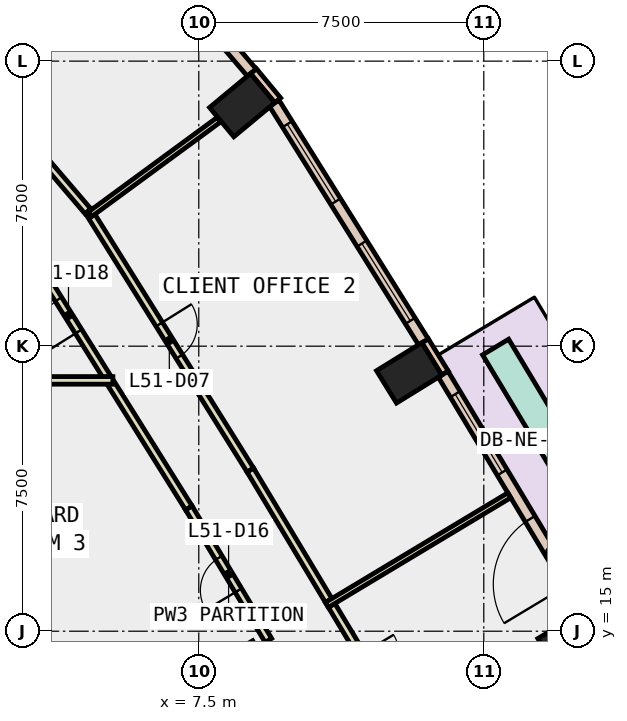
"""IFC4 building model, lengths in metres.
Left out: names, types, materials, properties, quantities, classifications, styles, units other than length and angle.
Written with IfcOpenShell. Run it as: python <this file> out.ifc"""

import sys

from ifc_helpers import new_model, si_unit, direction, frame, frame_2d, origin, origin_2d, place, context, subcontext, project, spatial, rectangle, extrude, element, fill, save


model = new_model("IFC4")
c1 = context("Model", 3, precision=1e-05, world=origin(), true_north=direction((0.0, 1.0)))
c2 = subcontext(c1, "Body", "Model", "MODEL_VIEW")
j1 = project(units=[si_unit("LENGTHUNIT", "METRE"), si_unit("PLANEANGLEUNIT", "RADIAN")], contexts=[c1])
p1 = place(None, origin())
s1 = spatial("IfcSite", under=j1, at=p1, CompositionType="ELEMENT")
p2 = place(p1, origin())
s2 = spatial("IfcBuilding", under=s1, at=p2, CompositionType="ELEMENT")
p3 = place(p2, frame((0.0, 0.0, 227.6)))
s3 = spatial("IfcBuildingStorey", under=s2, at=p3, CompositionType="ELEMENT", Elevation=227.6)
for number, where, z_axis, x_axis in (
    (1, (17.28, 14.733, -0.4), (0.0, 0.0, 1.0), (-0.509, 0.861, 0.0)),
    (2, (13.036, 21.797, -0.4), (0.0, 0.0, 1.0), (-0.525, 0.851, 0.0)),
    (3, (8.642, 28.842, -0.4), (0.0, 0.0, 1.0), (-0.639, 0.769, 0.0)),
):
    element("IfcColumn", number, at=place(p3, frame(where, z_axis=z_axis, x_axis=x_axis)), inside=s3, PredefinedType="COLUMN", context=c2, shape_type="SweptSolid", body=[
        extrude(rectangle(XDim=1.0, YDim=1.4, at=origin_2d()), origin(), (0.0, 0.0, 1.0), 4.2),
    ])
p4 = place(p3, frame((13.98, 21.792, 0.0), z_axis=(0.0, 0.0, 1.0), x_axis=(-0.525648735675, 0.850701714282, 0.0)))
e4 = element("IfcWall", 4, at=p4, inside=s3, PredefinedType="STANDARD", context=c2, shape_type="SweptSolid", body=[
    extrude(rectangle(XDim=1.0, YDim=0.2, at=frame_2d((0.5, 0.0))), origin(), (0.0, 0.0, 1.0), 3.8),
])
p5 = place(p3, frame((9.577, 28.968, 0.0), z_axis=(0.0, 0.0, 1.0), x_axis=(-0.637972365578, 0.770059257953, 0.0)))
e5 = element("IfcWall", 5, at=p5, inside=s3, PredefinedType="STANDARD", context=c2, shape_type="SweptSolid", body=[
    extrude(rectangle(XDim=1.0, YDim=0.2, at=frame_2d((0.5, 0.0))), origin(), (0.0, 0.0, 1.0), 3.8),
])
p6 = place(p3, frame((17.669, 15.542, 0.0), z_axis=(0.0, 0.0, 1.0), x_axis=(-0.515049705348, 0.857160312323, 0.0)))
e6 = element("IfcWall", 6, at=p6, inside=s3, PredefinedType="STANDARD", context=c2, shape_type="SweptSolid", body=[
    extrude(rectangle(XDim=7.258, YDim=0.3, at=frame_2d((3.629, 0.0))), origin(), (0.0, 0.0, 1.0), 3.8),
])
p7 = place(p6, frame((0.814, 0.0, 0.0)))
e7 = element("IfcOpeningElement", 7, at=p7, cuts=e6, PredefinedType="OPENING", context=c2, shape_type="SweptSolid", body=[
    extrude(rectangle(XDim=2.0, YDim=2.4, at=frame_2d((1.0, 1.2))), frame((0.0, 0.16, 0.0), z_axis=(0.0, -1.0, 0.0), x_axis=(1.0, 0.0, 0.0)), (0.0, 0.0, 1.0), 0.32),
])
p8 = place(p6, frame((4.243, 0.0, 0.9)))
e8 = element("IfcOpeningElement", 8, at=p8, cuts=e6, PredefinedType="OPENING", context=c2, shape_type="SweptSolid", body=[
    extrude(rectangle(XDim=2.4, YDim=2.6, at=frame_2d((1.2, 1.3))), frame((0.0, 0.16, 0.0), z_axis=(0.0, -1.0, 0.0), x_axis=(1.0, 0.0, 0.0)), (0.0, 0.0, 1.0), 0.32),
])
p9 = place(p3, frame((13.41, 22.614, 0.0), z_axis=(0.0, 0.0, 1.0), x_axis=(-0.530037467052, 0.847974223383, 0.0)))
e9 = element("IfcWall", 9, at=p9, inside=s3, PredefinedType="STANDARD", context=c2, shape_type="SweptSolid", body=[
    extrude(rectangle(XDim=7.405, YDim=0.3, at=frame_2d((3.702, 0.0))), origin(), (0.0, 0.0, 1.0), 3.8),
])
p10 = place(p9, frame((0.651, 0.0, 0.9)))
e10 = element("IfcOpeningElement", 10, at=p10, cuts=e9, PredefinedType="OPENING", context=c2, shape_type="SweptSolid", body=[
    extrude(rectangle(XDim=2.4, YDim=2.6, at=frame_2d((1.2, 1.3))), frame((0.0, 0.16, 0.0), z_axis=(0.0, -1.0, 0.0), x_axis=(1.0, 0.0, 0.0)), (0.0, 0.0, 1.0), 0.32),
])
p11 = place(p9, frame((4.354, 0.0, 0.9)))
e11 = element("IfcOpeningElement", 11, at=p11, cuts=e9, PredefinedType="OPENING", context=c2, shape_type="SweptSolid", body=[
    extrude(rectangle(XDim=2.4, YDim=2.6, at=frame_2d((1.2, 1.3))), frame((0.0, 0.16, 0.0), z_axis=(0.0, -1.0, 0.0), x_axis=(1.0, 0.0, 0.0)), (0.0, 0.0, 1.0), 0.32),
])
p12 = place(p3, frame((8.895, 29.7, 0.0), z_axis=(0.0, 0.0, 1.0), x_axis=(-0.649967502437, 0.75996200285, 0.0)))
e12 = element("IfcWall", 12, at=p12, inside=s3, PredefinedType="STANDARD", context=c2, shape_type="SweptSolid", body=[
    extrude(rectangle(XDim=4.492, YDim=0.3, at=frame_2d((2.246, 0.0))), origin(), (0.0, 0.0, 1.0), 3.8),
])
p13 = place(p12, frame((1.546, 0.0, 0.9)))
e13 = element("IfcOpeningElement", 13, at=p13, cuts=e12, PredefinedType="OPENING", context=c2, shape_type="SweptSolid", body=[
    extrude(rectangle(XDim=1.4, YDim=2.6, at=frame_2d((0.7, 1.3))), frame((0.0, 0.16, 0.0), z_axis=(0.0, -1.0, 0.0), x_axis=(1.0, 0.0, 0.0)), (0.0, 0.0, 1.0), 0.32),
])
p14 = place(p3, frame((18.946, 16.426, 0.0), z_axis=(0.0, 0.0, 1.0), x_axis=(-0.51495344021, 0.857218148674, 0.0)))
e14 = element("IfcWall", 14, at=p14, inside=s3, PredefinedType="STANDARD", context=c2, shape_type="SweptSolid", body=[
    extrude(rectangle(XDim=7.059, YDim=0.8, at=frame_2d((3.529, 0.0))), origin(), (0.0, 0.0, 1.0), 0.8),
])
p15 = place(p3, frame((9.332, 14.759, 0.0), z_axis=(0.0, 0.0, 1.0), x_axis=(-0.514989912292, 0.857196237881, 0.0)))
e15 = element("IfcWall", 15, at=p15, inside=s3, PredefinedType="PARTITIONING", context=c2, shape_type="SweptSolid", body=[
    extrude(rectangle(XDim=4.068, YDim=0.2, at=frame_2d((2.034, 0.0))), origin(), (0.0, 0.0, 1.0), 3.8),
])
p16 = place(p15, frame((1.534, 0.0, 0.0)))
e16 = element("IfcOpeningElement", 16, at=p16, cuts=e15, PredefinedType="OPENING", context=c2, shape_type="SweptSolid", body=[
    extrude(rectangle(XDim=1.0, YDim=2.1, at=frame_2d((0.5, 1.05))), frame((0.0, 0.11, 0.0), z_axis=(0.0, -1.0, 0.0), x_axis=(1.0, 0.0, 0.0)), (0.0, 0.0, 1.0), 0.22),
])
p17 = place(p3, frame((7.237, 18.246, 0.0), z_axis=(0.0, 0.0, 1.0), x_axis=(-0.530175390862, 0.847887996686, 0.0)))
e17 = element("IfcWall", 17, at=p17, inside=s3, PredefinedType="PARTITIONING", context=c2, shape_type="SweptSolid", body=[
    extrude(rectangle(XDim=3.855, YDim=0.2, at=frame_2d((1.928, 0.0))), origin(), (0.0, 0.0, 1.0), 3.8),
])
p18 = place(p3, frame((5.087, 21.685, 0.0), z_axis=(0.0, 0.0, 1.0), x_axis=(-0.529998940003, 0.847998304005, 0.0)))
e18 = element("IfcWall", 18, at=p18, inside=s3, PredefinedType="PARTITIONING", context=c2, shape_type="SweptSolid", body=[
    extrude(rectangle(XDim=3.83, YDim=0.2, at=frame_2d((1.915, 0.0))), origin(), (0.0, 0.0, 1.0), 3.8),
])
p19 = place(p18, frame((1.416, 0.0, 0.0)))
e19 = element("IfcOpeningElement", 19, at=p19, cuts=e18, PredefinedType="OPENING", context=c2, shape_type="SweptSolid", body=[
    extrude(rectangle(XDim=1.0, YDim=2.1, at=frame_2d((0.5, 1.05))), frame((0.0, 0.11, 0.0), z_axis=(0.0, -1.0, 0.0), x_axis=(1.0, 0.0, 0.0)), (0.0, 0.0, 1.0), 0.22),
])
p20 = place(p3, frame((10.996, 15.679, 0.0), z_axis=(0.0, 0.0, 1.0), x_axis=(0.514800663461, -0.857309907152, 0.0)))
e20 = element("IfcWall", 20, at=p20, inside=s3, PredefinedType="PARTITIONING", context=c2, shape_type="SweptSolid", body=[
    extrude(rectangle(XDim=4.003, YDim=0.2, at=frame_2d((2.001, 0.0))), origin(), (0.0, 0.0, 1.0), 3.8),
])
p21 = place(p20, frame((1.502, 0.0, 0.0)))
e21 = element("IfcOpeningElement", 21, at=p21, cuts=e20, PredefinedType="OPENING", context=c2, shape_type="SweptSolid", body=[
    extrude(rectangle(XDim=1.0, YDim=2.1, at=frame_2d((0.5, 1.05))), frame((0.0, 0.11, 0.0), z_axis=(0.0, -1.0, 0.0), x_axis=(1.0, 0.0, 0.0)), (0.0, 0.0, 1.0), 0.22),
])
p22 = place(p3, frame((4.593, 26.061, 0.0), z_axis=(0.0, 0.0, 1.0), x_axis=(0.530012579093, -0.847989779421, 0.0)))
e22 = element("IfcWall", 22, at=p22, inside=s3, PredefinedType="PARTITIONING", context=c2, shape_type="SweptSolid", body=[
    extrude(rectangle(XDim=8.045, YDim=0.2, at=frame_2d((4.022, 0.0))), origin(), (0.0, 0.0, 1.0), 3.8),
])
p23 = place(p22, frame((3.522, 0.0, 0.0)))
e23 = element("IfcOpeningElement", 23, at=p23, cuts=e22, PredefinedType="OPENING", context=c2, shape_type="SweptSolid", body=[
    extrude(rectangle(XDim=1.0, YDim=2.1, at=frame_2d((0.5, 1.05))), frame((0.0, 0.11, 0.0), z_axis=(0.0, -1.0, 0.0), x_axis=(1.0, 0.0, 0.0)), (0.0, 0.0, 1.0), 0.22),
])
p24 = place(p3, frame((8.857, 19.239, 0.0), z_axis=(0.0, 0.0, 1.0), x_axis=(0.514953174362, -0.857218308376, 0.0)))
e24 = element("IfcWall", 24, at=p24, inside=s3, PredefinedType="PARTITIONING", context=c2, shape_type="SweptSolid", body=[
    extrude(rectangle(XDim=4.002, YDim=0.2, at=frame_2d((2.001, 0.0))), origin(), (0.0, 0.0, 1.0), 3.8),
])
p25 = place(p3, frame((2.316, 28.7, 0.0), z_axis=(0.0, 0.0, 1.0), x_axis=(0.650040973726, -0.759899159413, 0.0)))
e25 = element("IfcWall", 25, at=p25, inside=s3, PredefinedType="PARTITIONING", context=c2, shape_type="SweptSolid", body=[
    extrude(rectangle(XDim=3.485, YDim=0.2, at=frame_2d((1.742, 0.0))), origin(), (0.0, 0.0, 1.0), 3.8),
])
p26 = place(p3, frame((0.4, 21.6, 0.0), z_axis=(0.0, 0.0, 1.0), x_axis=(1.0, 0.0, 0.0)))
e26 = element("IfcWall", 26, at=p26, inside=s3, PredefinedType="PARTITIONING", context=c2, shape_type="SweptSolid", body=[
    extrude(rectangle(XDim=4.84, YDim=0.2, at=frame_2d((2.42, 0.0))), origin(), (0.0, 0.0, 1.0), 3.8),
])
p27 = place(p3, frame((10.871, 15.692, 0.0), z_axis=(0.0, 0.0, 1.0), x_axis=(0.857165756431, 0.515040645001, 0.0)))
e27 = element("IfcWall", 27, at=p27, inside=s3, PredefinedType="PARTITIONING", context=c2, shape_type="SweptSolid", body=[
    extrude(rectangle(XDim=5.6, YDim=0.15, at=frame_2d((2.8, 0.0))), origin(), (0.0, 0.0, 1.0), 3.8),
])
p28 = place(p3, frame((4.646, 25.976, 0.0), z_axis=(0.0, 0.0, 1.0), x_axis=(0.806134630684, 0.591732166788, 0.0)))
e28 = element("IfcWall", 28, at=p28, inside=s3, PredefinedType="PARTITIONING", context=c2, shape_type="SweptSolid", body=[
    extrude(rectangle(XDim=4.193, YDim=0.15, at=frame_2d((2.096, 0.0))), origin(), (0.0, 0.0, 1.0), 3.8),
])
p29 = place(p3, frame((7.541, 13.838, 0.0), z_axis=(0.0, 0.0, 1.0), x_axis=(0.86593636949, 0.500154180222, 0.0)))
e29 = element("IfcWall", 29, at=p29, inside=s3, PredefinedType="PARTITIONING", context=c2, shape_type="SweptSolid", body=[
    extrude(rectangle(XDim=1.648, YDim=0.2, at=frame_2d((0.824, 0.0))), origin(), (0.0, 0.0, 1.0), 3.8),
])
p30 = place(p7, origin())
e30 = element("IfcDoor", 30, at=p30, inside=s3, OperationType="SLIDING_TO_LEFT", PredefinedType="DOOR", context=c2, shape_type="SweptSolid", body=[
    extrude(rectangle(XDim=2.0, YDim=2.4, at=frame_2d((1.0, 1.2))), frame((0.0, 0.025, 0.0), z_axis=(0.0, -1.0, 0.0), x_axis=(1.0, 0.0, 0.0)), (0.0, 0.0, 1.0), 0.05),
])
fill(e7, e30)
p31 = place(p8, origin())
e31 = element("IfcWindow", 31, at=p31, inside=s3, PartitioningType="SINGLE_PANEL", PredefinedType="WINDOW", context=c2, shape_type="SweptSolid", body=[
    extrude(rectangle(XDim=2.4, YDim=2.6, at=frame_2d((1.2, 1.3))), frame((0.0, 0.03, 0.0), z_axis=(0.0, -1.0, 0.0), x_axis=(1.0, 0.0, 0.0)), (0.0, 0.0, 1.0), 0.06),
])
fill(e8, e31)
p32 = place(p10, origin())
e32 = element("IfcWindow", 32, at=p32, inside=s3, PartitioningType="SINGLE_PANEL", PredefinedType="WINDOW", context=c2, shape_type="SweptSolid", body=[
    extrude(rectangle(XDim=2.4, YDim=2.6, at=frame_2d((1.2, 1.3))), frame((0.0, 0.03, 0.0), z_axis=(0.0, -1.0, 0.0), x_axis=(1.0, 0.0, 0.0)), (0.0, 0.0, 1.0), 0.06),
])
fill(e10, e32)
p33 = place(p11, origin())
e33 = element("IfcWindow", 33, at=p33, inside=s3, PartitioningType="SINGLE_PANEL", PredefinedType="WINDOW", context=c2, shape_type="SweptSolid", body=[
    extrude(rectangle(XDim=2.4, YDim=2.6, at=frame_2d((1.2, 1.3))), frame((0.0, 0.03, 0.0), z_axis=(0.0, -1.0, 0.0), x_axis=(1.0, 0.0, 0.0)), (0.0, 0.0, 1.0), 0.06),
])
fill(e11, e33)
p34 = place(p23, origin())
e34 = element("IfcDoor", 34, at=p34, inside=s3, OperationType="SINGLE_SWING_LEFT", PredefinedType="DOOR", context=c2, shape_type="SweptSolid", body=[
    extrude(rectangle(XDim=1.0, YDim=2.1, at=frame_2d((0.5, 1.05))), frame((0.0, 0.025, 0.0), z_axis=(0.0, -1.0, 0.0), x_axis=(1.0, 0.0, 0.0)), (0.0, 0.0, 1.0), 0.05),
])
fill(e23, e34)
p35 = place(p16, origin())
e35 = element("IfcDoor", 35, at=p35, inside=s3, OperationType="SINGLE_SWING_LEFT", PredefinedType="DOOR", context=c2, shape_type="SweptSolid", body=[
    extrude(rectangle(XDim=1.0, YDim=2.1, at=frame_2d((0.5, 1.05))), frame((0.0, 0.025, 0.0), z_axis=(0.0, -1.0, 0.0), x_axis=(1.0, 0.0, 0.0)), (0.0, 0.0, 1.0), 0.05),
])
fill(e16, e35)
p36 = place(p19, origin())
e36 = element("IfcDoor", 36, at=p36, inside=s3, OperationType="SINGLE_SWING_LEFT", PredefinedType="DOOR", context=c2, shape_type="SweptSolid", body=[
    extrude(rectangle(XDim=1.0, YDim=2.1, at=frame_2d((0.5, 1.05))), frame((0.0, 0.025, 0.0), z_axis=(0.0, -1.0, 0.0), x_axis=(1.0, 0.0, 0.0)), (0.0, 0.0, 1.0), 0.05),
])
fill(e19, e36)
save(model, sys.argv[1])
